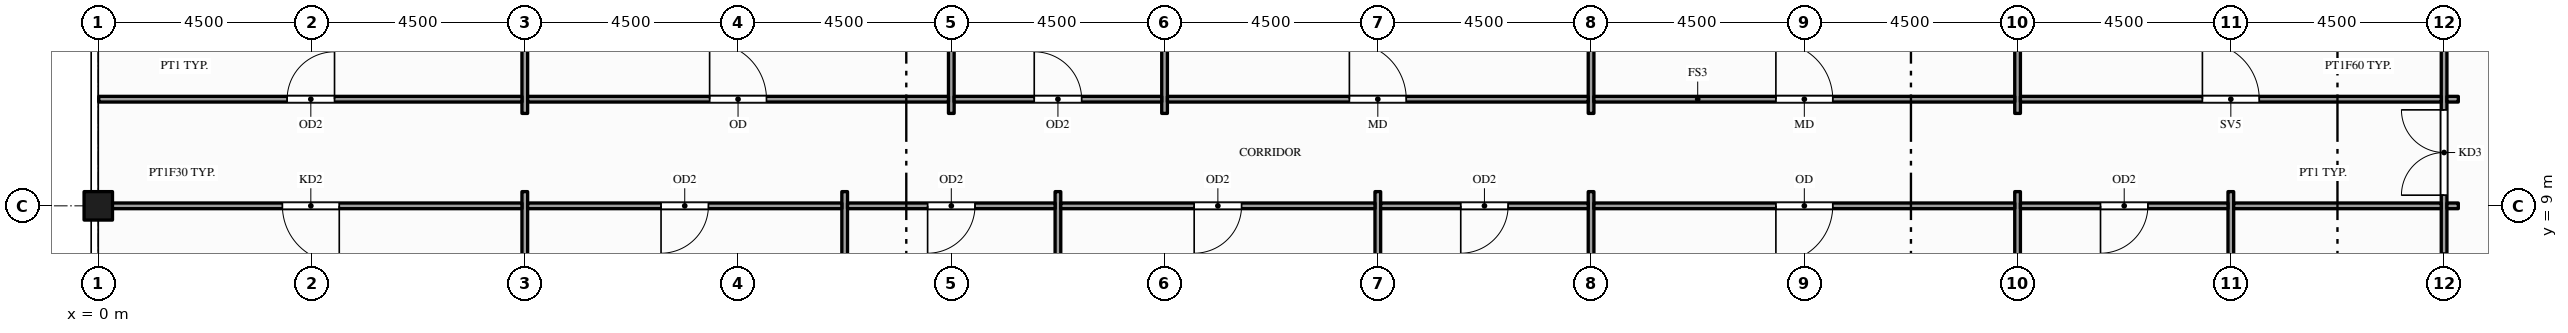
"""IFC4 building model, lengths in metres.
Left out: names, types, materials, properties, quantities, classifications, styles, units other than length and angle.
Written with IfcOpenShell. Run it as: python <this file> out.ifc"""

import sys

from ifc_helpers import new_model, si_unit, direction, frame, frame_2d, origin, origin_2d, place, context, subcontext, project, spatial, rectangle, hollow_rectangle, extrude, element, fill, save


model = new_model("IFC4")
c1 = context("Model", 3, precision=1e-05, world=origin(), true_north=direction((0.0, 1.0)))
c2 = subcontext(c1, "Body", "Model", "MODEL_VIEW")
j1 = project(units=[si_unit("LENGTHUNIT", "METRE"), si_unit("PLANEANGLEUNIT", "RADIAN")], contexts=[c1])
p1 = place(None, origin())
s1 = spatial("IfcSite", under=j1, at=p1, CompositionType="ELEMENT")
p2 = place(p1, origin())
s2 = spatial("IfcBuilding", under=s1, at=p2, CompositionType="ELEMENT")
p3 = place(p2, frame((0.0, 0.0, 327.5)))
s3 = spatial("IfcBuildingStorey", under=s2, at=p3, CompositionType="ELEMENT", Elevation=327.5)
p4 = place(p3, frame((0.0, 9.0, -0.15), z_axis=(0.0, 0.0, 1.0), x_axis=(1.0, 0.0, 0.0)))
e1 = element("IfcColumn", 1, at=p4, inside=s3, PredefinedType="COLUMN", context=c2, shape_type="SweptSolid", body=[
    extrude(hollow_rectangle(XDim=0.6, YDim=0.6, WallThickness=0.03, at=origin_2d()), origin(), (0.0, 0.0, 1.0), 4.5),
])
p5 = place(p3, frame((9.0, 3.875, 0.0), z_axis=(0.0, 0.0, 1.0), x_axis=(0.0, 1.0, 0.0)))
e2 = element("IfcWall", 2, at=p5, inside=s3, PredefinedType="PARTITIONING", context=c2, shape_type="SweptSolid", body=[
    extrude(rectangle(XDim=5.425, YDim=0.12, at=frame_2d((2.712, 0.0))), origin(), (0.0, 0.0, 1.0), 3.359),
])
p6 = place(p3, frame((9.0, 10.95, 0.0), z_axis=(0.0, 0.0, 1.0), x_axis=(0.0, 1.0, 0.0)))
e3 = element("IfcWall", 3, at=p6, inside=s3, PredefinedType="PARTITIONING", context=c2, shape_type="SweptSolid", body=[
    extrude(rectangle(XDim=11.54, YDim=0.12, at=frame_2d((5.77, 0.0))), origin(), (0.0, 0.0, 1.0), 3.359),
])
p7 = place(p3, frame((15.75, 0.01, 0.0), z_axis=(0.0, 0.0, 1.0), x_axis=(0.0, 1.0, 0.0)))
e4 = element("IfcWall", 4, at=p7, inside=s3, PredefinedType="PARTITIONING", context=c2, shape_type="SweptSolid", body=[
    extrude(rectangle(XDim=9.29, YDim=0.12, at=frame_2d((4.645, 0.0))), origin(), (0.0, 0.0, 1.0), 3.359),
])
p8 = place(p3, frame((18.0, 10.95, 0.0), z_axis=(0.0, 0.0, 1.0), x_axis=(0.0, 1.0, 0.0)))
e5 = element("IfcWall", 5, at=p8, inside=s3, PredefinedType="PARTITIONING", context=c2, shape_type="SweptSolid", body=[
    extrude(rectangle(XDim=11.54, YDim=0.12, at=frame_2d((5.77, 0.0))), origin(), (0.0, 0.0, 1.0), 3.359),
])
p9 = place(p3, frame((20.25, 0.01, 0.0), z_axis=(0.0, 0.0, 1.0), x_axis=(0.0, 1.0, 0.0)))
e6 = element("IfcWall", 6, at=p9, inside=s3, PredefinedType="PARTITIONING", context=c2, shape_type="SweptSolid", body=[
    extrude(rectangle(XDim=9.29, YDim=0.12, at=frame_2d((4.645, 0.0))), origin(), (0.0, 0.0, 1.0), 3.359),
])
p10 = place(p3, frame((22.5, 10.95, 0.0), z_axis=(0.0, 0.0, 1.0), x_axis=(0.0, 1.0, 0.0)))
e7 = element("IfcWall", 7, at=p10, inside=s3, PredefinedType="PARTITIONING", context=c2, shape_type="SweptSolid", body=[
    extrude(rectangle(XDim=11.54, YDim=0.12, at=frame_2d((5.77, 0.0))), origin(), (0.0, 0.0, 1.0), 3.359),
])
for number, where, z_axis, x_axis in (
    (8, (27.0, 0.01, 0.0), (0.0, 0.0, 1.0), (0.0, 1.0, 0.0)),
    (9, (31.5, 0.01, 0.0), (0.0, 0.0, 1.0), (0.0, 1.0, 0.0)),
):
    element("IfcWall", number, at=place(p3, frame(where, z_axis=z_axis, x_axis=x_axis)), inside=s3, PredefinedType="PARTITIONING", context=c2, shape_type="SweptSolid", body=[
        extrude(rectangle(XDim=9.29, YDim=0.12, at=frame_2d((4.645, 0.0))), origin(), (0.0, 0.0, 1.0), 3.359),
    ])
p11 = place(p3, frame((31.5, 10.95, 0.0), z_axis=(0.0, 0.0, 1.0), x_axis=(0.0, 1.0, 0.0)))
e10 = element("IfcWall", 10, at=p11, inside=s3, PredefinedType="PARTITIONING", context=c2, shape_type="SweptSolid", body=[
    extrude(rectangle(XDim=11.54, YDim=0.12, at=frame_2d((5.77, 0.0))), origin(), (0.0, 0.0, 1.0), 3.359),
])
p12 = place(p3, frame((40.5, 0.01, 0.0), z_axis=(0.0, 0.0, 1.0), x_axis=(0.0, 1.0, 0.0)))
e11 = element("IfcWall", 11, at=p12, inside=s3, PredefinedType="PARTITIONING", context=c2, shape_type="SweptSolid", body=[
    extrude(rectangle(XDim=9.29, YDim=0.12, at=frame_2d((4.645, 0.0))), origin(), (0.0, 0.0, 1.0), 3.359),
])
p13 = place(p3, frame((40.5, 10.95, 0.0), z_axis=(0.0, 0.0, 1.0), x_axis=(0.0, 1.0, 0.0)))
e12 = element("IfcWall", 12, at=p13, inside=s3, PredefinedType="PARTITIONING", context=c2, shape_type="SweptSolid", body=[
    extrude(rectangle(XDim=11.54, YDim=0.12, at=frame_2d((5.77, 0.0))), origin(), (0.0, 0.0, 1.0), 3.359),
])
p14 = place(p3, frame((45.0, 0.01, 0.0), z_axis=(0.0, 0.0, 1.0), x_axis=(0.0, 1.0, 0.0)))
e13 = element("IfcWall", 13, at=p14, inside=s3, PredefinedType="PARTITIONING", context=c2, shape_type="SweptSolid", body=[
    extrude(rectangle(XDim=9.29, YDim=0.12, at=frame_2d((4.645, 0.0))), origin(), (0.0, 0.0, 1.0), 3.359),
])
p15 = place(p3, frame((49.5, 0.01, 0.0), z_axis=(0.0, 0.0, 1.0), x_axis=(0.0, 1.0, 0.0)))
e14 = element("IfcWall", 14, at=p15, inside=s3, PredefinedType="PARTITIONING", context=c2, shape_type="SweptSolid", body=[
    extrude(rectangle(XDim=22.48, YDim=0.12, at=frame_2d((11.24, 0.0))), origin(), (0.0, 0.0, 1.0), 3.359),
])
p16 = place(p15, frame((9.215, 0.0, 0.0)))
e15 = element("IfcOpeningElement", 15, at=p16, cuts=e14, PredefinedType="OPENING", context=c2, shape_type="SweptSolid", body=[
    extrude(rectangle(XDim=1.8, YDim=2.1, at=frame_2d((0.9, 1.05))), frame((0.0, 0.07, 0.0), z_axis=(0.0, -1.0, 0.0), x_axis=(1.0, 0.0, 0.0)), (0.0, 0.0, 1.0), 0.14),
])
p17 = place(p15, frame((0.99, 0.0, 0.0)))
e16 = element("IfcOpeningElement", 16, at=p17, cuts=e14, PredefinedType="OPENING", context=c2, shape_type="SweptSolid", body=[
    extrude(rectangle(XDim=0.9, YDim=2.1, at=frame_2d((0.45, 1.05))), frame((0.0, 0.07, 0.0), z_axis=(0.0, -1.0, 0.0), x_axis=(1.0, 0.0, 0.0)), (0.0, 0.0, 1.0), 0.14),
])
p18 = place(p15, frame((4.04, 0.0, 0.0)))
e17 = element("IfcOpeningElement", 17, at=p18, cuts=e14, PredefinedType="OPENING", context=c2, shape_type="SweptSolid", body=[
    extrude(rectangle(XDim=0.9, YDim=2.1, at=frame_2d((0.45, 1.05))), frame((0.0, 0.07, 0.0), z_axis=(0.0, -1.0, 0.0), x_axis=(1.0, 0.0, 0.0)), (0.0, 0.0, 1.0), 0.14),
])
p19 = place(p15, frame((6.99, 0.0, 0.0)))
e18 = element("IfcOpeningElement", 18, at=p19, cuts=e14, PredefinedType="OPENING", context=c2, shape_type="SweptSolid", body=[
    extrude(rectangle(XDim=1.0, YDim=2.1, at=frame_2d((0.5, 1.05))), frame((0.0, 0.07, 0.0), z_axis=(0.0, -1.0, 0.0), x_axis=(1.0, 0.0, 0.0)), (0.0, 0.0, 1.0), 0.14),
])
p20 = place(p3, frame((0.01, 9.0, 0.0), z_axis=(0.0, 0.0, 1.0), x_axis=(1.0, 0.0, 0.0)))
e19 = element("IfcWall", 19, at=p20, inside=s3, PredefinedType="PARTITIONING", context=c2, shape_type="SweptSolid", body=[
    extrude(rectangle(XDim=8.93, YDim=0.12, at=frame_2d((4.465, 0.0))), origin(), (0.0, 0.0, 1.0), 3.359),
])
p21 = place(p20, frame((3.875, 0.0, 0.0)))
e20 = element("IfcOpeningElement", 20, at=p21, cuts=e19, PredefinedType="OPENING", context=c2, shape_type="SweptSolid", body=[
    extrude(rectangle(XDim=1.2, YDim=2.1, at=frame_2d((0.6, 1.05))), frame((0.0, 0.07, 0.0), z_axis=(0.0, -1.0, 0.0), x_axis=(1.0, 0.0, 0.0)), (0.0, 0.0, 1.0), 0.14),
])
p22 = place(p3, frame((9.06, 9.0, 0.0), z_axis=(0.0, 0.0, 1.0), x_axis=(1.0, 0.0, 0.0)))
e21 = element("IfcWall", 21, at=p22, inside=s3, PredefinedType="PARTITIONING", context=c2, shape_type="SweptSolid", body=[
    extrude(rectangle(XDim=6.63, YDim=0.12, at=frame_2d((3.315, 0.0))), origin(), (0.0, 0.0, 1.0), 3.359),
])
p23 = place(p22, frame((2.815, 0.0, 0.0)))
e22 = element("IfcOpeningElement", 22, at=p23, cuts=e21, PredefinedType="OPENING", context=c2, shape_type="SweptSolid", body=[
    extrude(rectangle(XDim=1.0, YDim=2.1, at=frame_2d((0.5, 1.05))), frame((0.0, 0.07, 0.0), z_axis=(0.0, -1.0, 0.0), x_axis=(1.0, 0.0, 0.0)), (0.0, 0.0, 1.0), 0.14),
])
p24 = place(p3, frame((15.81, 9.0, 0.0), z_axis=(0.0, 0.0, 1.0), x_axis=(1.0, 0.0, 0.0)))
e23 = element("IfcWall", 23, at=p24, inside=s3, PredefinedType="PARTITIONING", context=c2, shape_type="SweptSolid", body=[
    extrude(rectangle(XDim=4.38, YDim=0.12, at=frame_2d((2.19, 0.0))), origin(), (0.0, 0.0, 1.0), 3.359),
])
p25 = place(p24, frame((1.69, 0.0, 0.0)))
e24 = element("IfcOpeningElement", 24, at=p25, cuts=e23, PredefinedType="OPENING", context=c2, shape_type="SweptSolid", body=[
    extrude(rectangle(XDim=1.0, YDim=2.1, at=frame_2d((0.5, 1.05))), frame((0.0, 0.07, 0.0), z_axis=(0.0, -1.0, 0.0), x_axis=(1.0, 0.0, 0.0)), (0.0, 0.0, 1.0), 0.14),
])
p26 = place(p3, frame((20.31, 9.0, 0.0), z_axis=(0.0, 0.0, 1.0), x_axis=(1.0, 0.0, 0.0)))
e25 = element("IfcWall", 25, at=p26, inside=s3, PredefinedType="PARTITIONING", context=c2, shape_type="SweptSolid", body=[
    extrude(rectangle(XDim=6.63, YDim=0.12, at=frame_2d((3.315, 0.0))), origin(), (0.0, 0.0, 1.0), 3.359),
])
p27 = place(p26, frame((2.815, 0.0, 0.0)))
e26 = element("IfcOpeningElement", 26, at=p27, cuts=e25, PredefinedType="OPENING", context=c2, shape_type="SweptSolid", body=[
    extrude(rectangle(XDim=1.0, YDim=2.1, at=frame_2d((0.5, 1.05))), frame((0.0, 0.07, 0.0), z_axis=(0.0, -1.0, 0.0), x_axis=(1.0, 0.0, 0.0)), (0.0, 0.0, 1.0), 0.14),
])
p28 = place(p3, frame((27.06, 9.0, 0.0), z_axis=(0.0, 0.0, 1.0), x_axis=(1.0, 0.0, 0.0)))
e27 = element("IfcWall", 27, at=p28, inside=s3, PredefinedType="PARTITIONING", context=c2, shape_type="SweptSolid", body=[
    extrude(rectangle(XDim=4.38, YDim=0.12, at=frame_2d((2.19, 0.0))), origin(), (0.0, 0.0, 1.0), 3.359),
])
p29 = place(p28, frame((1.69, 0.0, 0.0)))
e28 = element("IfcOpeningElement", 28, at=p29, cuts=e27, PredefinedType="OPENING", context=c2, shape_type="SweptSolid", body=[
    extrude(rectangle(XDim=1.0, YDim=2.1, at=frame_2d((0.5, 1.05))), frame((0.0, 0.07, 0.0), z_axis=(0.0, -1.0, 0.0), x_axis=(1.0, 0.0, 0.0)), (0.0, 0.0, 1.0), 0.14),
])
p30 = place(p3, frame((31.56, 9.0, 0.0), z_axis=(0.0, 0.0, 1.0), x_axis=(1.0, 0.0, 0.0)))
e29 = element("IfcWall", 29, at=p30, inside=s3, PredefinedType="PARTITIONING", context=c2, shape_type="SweptSolid", body=[
    extrude(rectangle(XDim=8.88, YDim=0.12, at=frame_2d((4.44, 0.0))), origin(), (0.0, 0.0, 1.0), 3.359),
])
p31 = place(p30, frame((3.84, 0.0, 0.0)))
e30 = element("IfcOpeningElement", 30, at=p31, cuts=e29, PredefinedType="OPENING", context=c2, shape_type="SweptSolid", body=[
    extrude(rectangle(XDim=1.2, YDim=2.1, at=frame_2d((0.6, 1.05))), frame((0.0, 0.07, 0.0), z_axis=(0.0, -1.0, 0.0), x_axis=(1.0, 0.0, 0.0)), (0.0, 0.0, 1.0), 0.14),
])
p32 = place(p3, frame((40.56, 9.0, 0.0), z_axis=(0.0, 0.0, 1.0), x_axis=(1.0, 0.0, 0.0)))
e31 = element("IfcWall", 31, at=p32, inside=s3, PredefinedType="PARTITIONING", context=c2, shape_type="SweptSolid", body=[
    extrude(rectangle(XDim=4.38, YDim=0.12, at=frame_2d((2.19, 0.0))), origin(), (0.0, 0.0, 1.0), 3.359),
])
p33 = place(p32, frame((1.69, 0.0, 0.0)))
e32 = element("IfcOpeningElement", 32, at=p33, cuts=e31, PredefinedType="OPENING", context=c2, shape_type="SweptSolid", body=[
    extrude(rectangle(XDim=1.0, YDim=2.1, at=frame_2d((0.5, 1.05))), frame((0.0, 0.07, 0.0), z_axis=(0.0, -1.0, 0.0), x_axis=(1.0, 0.0, 0.0)), (0.0, 0.0, 1.0), 0.14),
])
p34 = place(p3, frame((45.06, 9.0, 0.0), z_axis=(0.0, 0.0, 1.0), x_axis=(1.0, 0.0, 0.0)))
e33 = element("IfcWall", 33, at=p34, inside=s3, PredefinedType="PARTITIONING", context=c2, shape_type="SweptSolid", body=[
    extrude(rectangle(XDim=4.38, YDim=0.12, at=frame_2d((2.19, 0.0))), origin(), (0.0, 0.0, 1.0), 3.359),
])
p35 = place(p3, frame((49.56, 9.0, 0.0), z_axis=(0.0, 0.0, 1.0), x_axis=(1.0, 0.0, 0.0)))
e34 = element("IfcWall", 34, at=p35, inside=s3, PredefinedType="PARTITIONING", context=c2, shape_type="SweptSolid", body=[
    extrude(rectangle(XDim=0.24, YDim=0.12, at=frame_2d((0.12, 0.0))), origin(), (0.0, 0.0, 1.0), 3.359),
])
p36 = place(p3, frame((0.01, 11.25, 0.0), z_axis=(0.0, 0.0, 1.0), x_axis=(1.0, 0.0, 0.0)))
e35 = element("IfcWall", 35, at=p36, inside=s3, PredefinedType="PARTITIONING", context=c2, shape_type="SweptSolid", body=[
    extrude(rectangle(XDim=8.93, YDim=0.12, at=frame_2d((4.465, 0.0))), origin(), (0.0, 0.0, 1.0), 3.359),
])
p37 = place(p36, frame((3.975, 0.0, 0.0)))
e36 = element("IfcOpeningElement", 36, at=p37, cuts=e35, PredefinedType="OPENING", context=c2, shape_type="SweptSolid", body=[
    extrude(rectangle(XDim=1.0, YDim=2.1, at=frame_2d((0.5, 1.05))), frame((0.0, 0.07, 0.0), z_axis=(0.0, -1.0, 0.0), x_axis=(1.0, 0.0, 0.0)), (0.0, 0.0, 1.0), 0.14),
])
p38 = place(p3, frame((9.06, 11.25, 0.0), z_axis=(0.0, 0.0, 1.0), x_axis=(1.0, 0.0, 0.0)))
e37 = element("IfcWall", 37, at=p38, inside=s3, PredefinedType="PARTITIONING", context=c2, shape_type="SweptSolid", body=[
    extrude(rectangle(XDim=8.88, YDim=0.12, at=frame_2d((4.44, 0.0))), origin(), (0.0, 0.0, 1.0), 3.359),
])
p39 = place(p38, frame((3.84, 0.0, 0.0)))
e38 = element("IfcOpeningElement", 38, at=p39, cuts=e37, PredefinedType="OPENING", context=c2, shape_type="SweptSolid", body=[
    extrude(rectangle(XDim=1.2, YDim=2.1, at=frame_2d((0.6, 1.05))), frame((0.0, 0.07, 0.0), z_axis=(0.0, -1.0, 0.0), x_axis=(1.0, 0.0, 0.0)), (0.0, 0.0, 1.0), 0.14),
])
p40 = place(p3, frame((18.06, 11.25, 0.0), z_axis=(0.0, 0.0, 1.0), x_axis=(1.0, 0.0, 0.0)))
e39 = element("IfcWall", 39, at=p40, inside=s3, PredefinedType="PARTITIONING", context=c2, shape_type="SweptSolid", body=[
    extrude(rectangle(XDim=4.38, YDim=0.12, at=frame_2d((2.19, 0.0))), origin(), (0.0, 0.0, 1.0), 3.359),
])
p41 = place(p40, frame((1.69, 0.0, 0.0)))
e40 = element("IfcOpeningElement", 40, at=p41, cuts=e39, PredefinedType="OPENING", context=c2, shape_type="SweptSolid", body=[
    extrude(rectangle(XDim=1.0, YDim=2.1, at=frame_2d((0.5, 1.05))), frame((0.0, 0.07, 0.0), z_axis=(0.0, -1.0, 0.0), x_axis=(1.0, 0.0, 0.0)), (0.0, 0.0, 1.0), 0.14),
])
p42 = place(p3, frame((22.56, 11.25, 0.0), z_axis=(0.0, 0.0, 1.0), x_axis=(1.0, 0.0, 0.0)))
e41 = element("IfcWall", 41, at=p42, inside=s3, PredefinedType="PARTITIONING", context=c2, shape_type="SweptSolid", body=[
    extrude(rectangle(XDim=8.88, YDim=0.12, at=frame_2d((4.44, 0.0))), origin(), (0.0, 0.0, 1.0), 3.359),
])
p43 = place(p42, frame((3.84, 0.0, 0.0)))
e42 = element("IfcOpeningElement", 42, at=p43, cuts=e41, PredefinedType="OPENING", context=c2, shape_type="SweptSolid", body=[
    extrude(rectangle(XDim=1.2, YDim=2.1, at=frame_2d((0.6, 1.05))), frame((0.0, 0.07, 0.0), z_axis=(0.0, -1.0, 0.0), x_axis=(1.0, 0.0, 0.0)), (0.0, 0.0, 1.0), 0.14),
])
p44 = place(p3, frame((31.56, 11.25, 0.0), z_axis=(0.0, 0.0, 1.0), x_axis=(1.0, 0.0, 0.0)))
e43 = element("IfcWall", 43, at=p44, inside=s3, PredefinedType="PARTITIONING", context=c2, shape_type="SweptSolid", body=[
    extrude(rectangle(XDim=8.88, YDim=0.12, at=frame_2d((4.44, 0.0))), origin(), (0.0, 0.0, 1.0), 3.359),
])
p45 = place(p44, frame((3.84, 0.0, 0.0)))
e44 = element("IfcOpeningElement", 44, at=p45, cuts=e43, PredefinedType="OPENING", context=c2, shape_type="SweptSolid", body=[
    extrude(rectangle(XDim=1.2, YDim=2.1, at=frame_2d((0.6, 1.05))), frame((0.0, 0.07, 0.0), z_axis=(0.0, -1.0, 0.0), x_axis=(1.0, 0.0, 0.0)), (0.0, 0.0, 1.0), 0.14),
])
p46 = place(p3, frame((40.56, 11.25, 0.0), z_axis=(0.0, 0.0, 1.0), x_axis=(1.0, 0.0, 0.0)))
e45 = element("IfcWall", 45, at=p46, inside=s3, PredefinedType="PARTITIONING", context=c2, shape_type="SweptSolid", body=[
    extrude(rectangle(XDim=8.88, YDim=0.12, at=frame_2d((4.44, 0.0))), origin(), (0.0, 0.0, 1.0), 3.359),
])
p47 = place(p46, frame((3.84, 0.0, 0.0)))
e46 = element("IfcOpeningElement", 46, at=p47, cuts=e45, PredefinedType="OPENING", context=c2, shape_type="SweptSolid", body=[
    extrude(rectangle(XDim=1.2, YDim=2.1, at=frame_2d((0.6, 1.05))), frame((0.0, 0.07, 0.0), z_axis=(0.0, -1.0, 0.0), x_axis=(1.0, 0.0, 0.0)), (0.0, 0.0, 1.0), 0.14),
])
p48 = place(p3, frame((49.56, 11.25, 0.0), z_axis=(0.0, 0.0, 1.0), x_axis=(1.0, 0.0, 0.0)))
e47 = element("IfcWall", 47, at=p48, inside=s3, PredefinedType="PARTITIONING", context=c2, shape_type="SweptSolid", body=[
    extrude(rectangle(XDim=0.24, YDim=0.12, at=frame_2d((0.12, 0.0))), origin(), (0.0, 0.0, 1.0), 3.359),
])
p49 = place(p16, origin())
e48 = element("IfcDoor", 48, at=p49, inside=s3, OperationType="DOUBLE_DOOR_SINGLE_SWING", PredefinedType="DOOR", context=c2, shape_type="SweptSolid", body=[
    extrude(rectangle(XDim=1.8, YDim=2.1, at=frame_2d((0.9, 1.05))), frame((0.0, 0.025, 0.0), z_axis=(0.0, -1.0, 0.0), x_axis=(1.0, 0.0, 0.0)), (0.0, 0.0, 1.0), 0.05),
])
fill(e15, e48)
p50 = place(p21, origin())
e49 = element("IfcDoor", 49, at=p50, inside=s3, OperationType="SINGLE_SWING_RIGHT", PredefinedType="DOOR", context=c2, shape_type="SweptSolid", body=[
    extrude(rectangle(XDim=1.2, YDim=2.1, at=frame_2d((0.6, 1.05))), frame((0.0, 0.025, 0.0), z_axis=(0.0, -1.0, 0.0), x_axis=(1.0, 0.0, 0.0)), (0.0, 0.0, 1.0), 0.05),
])
fill(e20, e49)
p51 = place(p23, origin())
e50 = element("IfcDoor", 50, at=p51, inside=s3, OperationType="SINGLE_SWING_LEFT", PredefinedType="DOOR", context=c2, shape_type="SweptSolid", body=[
    extrude(rectangle(XDim=1.0, YDim=2.1, at=frame_2d((0.5, 1.05))), frame((0.0, 0.025, 0.0), z_axis=(0.0, -1.0, 0.0), x_axis=(1.0, 0.0, 0.0)), (0.0, 0.0, 1.0), 0.05),
])
fill(e22, e50)
p52 = place(p25, origin())
e51 = element("IfcDoor", 51, at=p52, inside=s3, OperationType="SINGLE_SWING_LEFT", PredefinedType="DOOR", context=c2, shape_type="SweptSolid", body=[
    extrude(rectangle(XDim=1.0, YDim=2.1, at=frame_2d((0.5, 1.05))), frame((0.0, 0.025, 0.0), z_axis=(0.0, -1.0, 0.0), x_axis=(1.0, 0.0, 0.0)), (0.0, 0.0, 1.0), 0.05),
])
fill(e24, e51)
p53 = place(p27, origin())
e52 = element("IfcDoor", 52, at=p53, inside=s3, OperationType="SINGLE_SWING_LEFT", PredefinedType="DOOR", context=c2, shape_type="SweptSolid", body=[
    extrude(rectangle(XDim=1.0, YDim=2.1, at=frame_2d((0.5, 1.05))), frame((0.0, 0.025, 0.0), z_axis=(0.0, -1.0, 0.0), x_axis=(1.0, 0.0, 0.0)), (0.0, 0.0, 1.0), 0.05),
])
fill(e26, e52)
p54 = place(p29, origin())
e53 = element("IfcDoor", 53, at=p54, inside=s3, OperationType="SINGLE_SWING_LEFT", PredefinedType="DOOR", context=c2, shape_type="SweptSolid", body=[
    extrude(rectangle(XDim=1.0, YDim=2.1, at=frame_2d((0.5, 1.05))), frame((0.0, 0.025, 0.0), z_axis=(0.0, -1.0, 0.0), x_axis=(1.0, 0.0, 0.0)), (0.0, 0.0, 1.0), 0.05),
])
fill(e28, e53)
p55 = place(p31, origin())
e54 = element("IfcDoor", 54, at=p55, inside=s3, OperationType="SINGLE_SWING_LEFT", PredefinedType="DOOR", context=c2, shape_type="SweptSolid", body=[
    extrude(rectangle(XDim=1.2, YDim=2.1, at=frame_2d((0.6, 1.05))), frame((0.0, 0.025, 0.0), z_axis=(0.0, -1.0, 0.0), x_axis=(1.0, 0.0, 0.0)), (0.0, 0.0, 1.0), 0.05),
])
fill(e30, e54)
p56 = place(p33, origin())
e55 = element("IfcDoor", 55, at=p56, inside=s3, OperationType="SINGLE_SWING_LEFT", PredefinedType="DOOR", context=c2, shape_type="SweptSolid", body=[
    extrude(rectangle(XDim=1.0, YDim=2.1, at=frame_2d((0.5, 1.05))), frame((0.0, 0.025, 0.0), z_axis=(0.0, -1.0, 0.0), x_axis=(1.0, 0.0, 0.0)), (0.0, 0.0, 1.0), 0.05),
])
fill(e32, e55)
p57 = place(p37, origin())
e56 = element("IfcDoor", 56, at=p57, inside=s3, OperationType="SINGLE_SWING_RIGHT", PredefinedType="DOOR", context=c2, shape_type="SweptSolid", body=[
    extrude(rectangle(XDim=1.0, YDim=2.1, at=frame_2d((0.5, 1.05))), frame((0.0, 0.025, 0.0), z_axis=(0.0, -1.0, 0.0), x_axis=(1.0, 0.0, 0.0)), (0.0, 0.0, 1.0), 0.05),
])
fill(e36, e56)
p58 = place(p39, origin())
e57 = element("IfcDoor", 57, at=p58, inside=s3, OperationType="SINGLE_SWING_LEFT", PredefinedType="DOOR", context=c2, shape_type="SweptSolid", body=[
    extrude(rectangle(XDim=1.2, YDim=2.1, at=frame_2d((0.6, 1.05))), frame((0.0, 0.025, 0.0), z_axis=(0.0, -1.0, 0.0), x_axis=(1.0, 0.0, 0.0)), (0.0, 0.0, 1.0), 0.05),
])
fill(e38, e57)
p59 = place(p41, origin())
e58 = element("IfcDoor", 58, at=p59, inside=s3, OperationType="SINGLE_SWING_LEFT", PredefinedType="DOOR", context=c2, shape_type="SweptSolid", body=[
    extrude(rectangle(XDim=1.0, YDim=2.1, at=frame_2d((0.5, 1.05))), frame((0.0, 0.025, 0.0), z_axis=(0.0, -1.0, 0.0), x_axis=(1.0, 0.0, 0.0)), (0.0, 0.0, 1.0), 0.05),
])
fill(e40, e58)
p60 = place(p43, origin())
e59 = element("IfcDoor", 59, at=p60, inside=s3, OperationType="SINGLE_SWING_LEFT", PredefinedType="DOOR", context=c2, shape_type="SweptSolid", body=[
    extrude(rectangle(XDim=1.2, YDim=2.1, at=frame_2d((0.6, 1.05))), frame((0.0, 0.025, 0.0), z_axis=(0.0, -1.0, 0.0), x_axis=(1.0, 0.0, 0.0)), (0.0, 0.0, 1.0), 0.05),
])
fill(e42, e59)
p61 = place(p45, origin())
e60 = element("IfcDoor", 60, at=p61, inside=s3, OperationType="SINGLE_SWING_LEFT", PredefinedType="DOOR", context=c2, shape_type="SweptSolid", body=[
    extrude(rectangle(XDim=1.2, YDim=2.1, at=frame_2d((0.6, 1.05))), frame((0.0, 0.025, 0.0), z_axis=(0.0, -1.0, 0.0), x_axis=(1.0, 0.0, 0.0)), (0.0, 0.0, 1.0), 0.05),
])
fill(e44, e60)
p62 = place(p47, origin())
e61 = element("IfcDoor", 61, at=p62, inside=s3, OperationType="SINGLE_SWING_LEFT", PredefinedType="DOOR", context=c2, shape_type="SweptSolid", body=[
    extrude(rectangle(XDim=1.2, YDim=2.1, at=frame_2d((0.6, 1.05))), frame((0.0, 0.025, 0.0), z_axis=(0.0, -1.0, 0.0), x_axis=(1.0, 0.0, 0.0)), (0.0, 0.0, 1.0), 0.05),
])
fill(e46, e61)
save(model, sys.argv[1])
